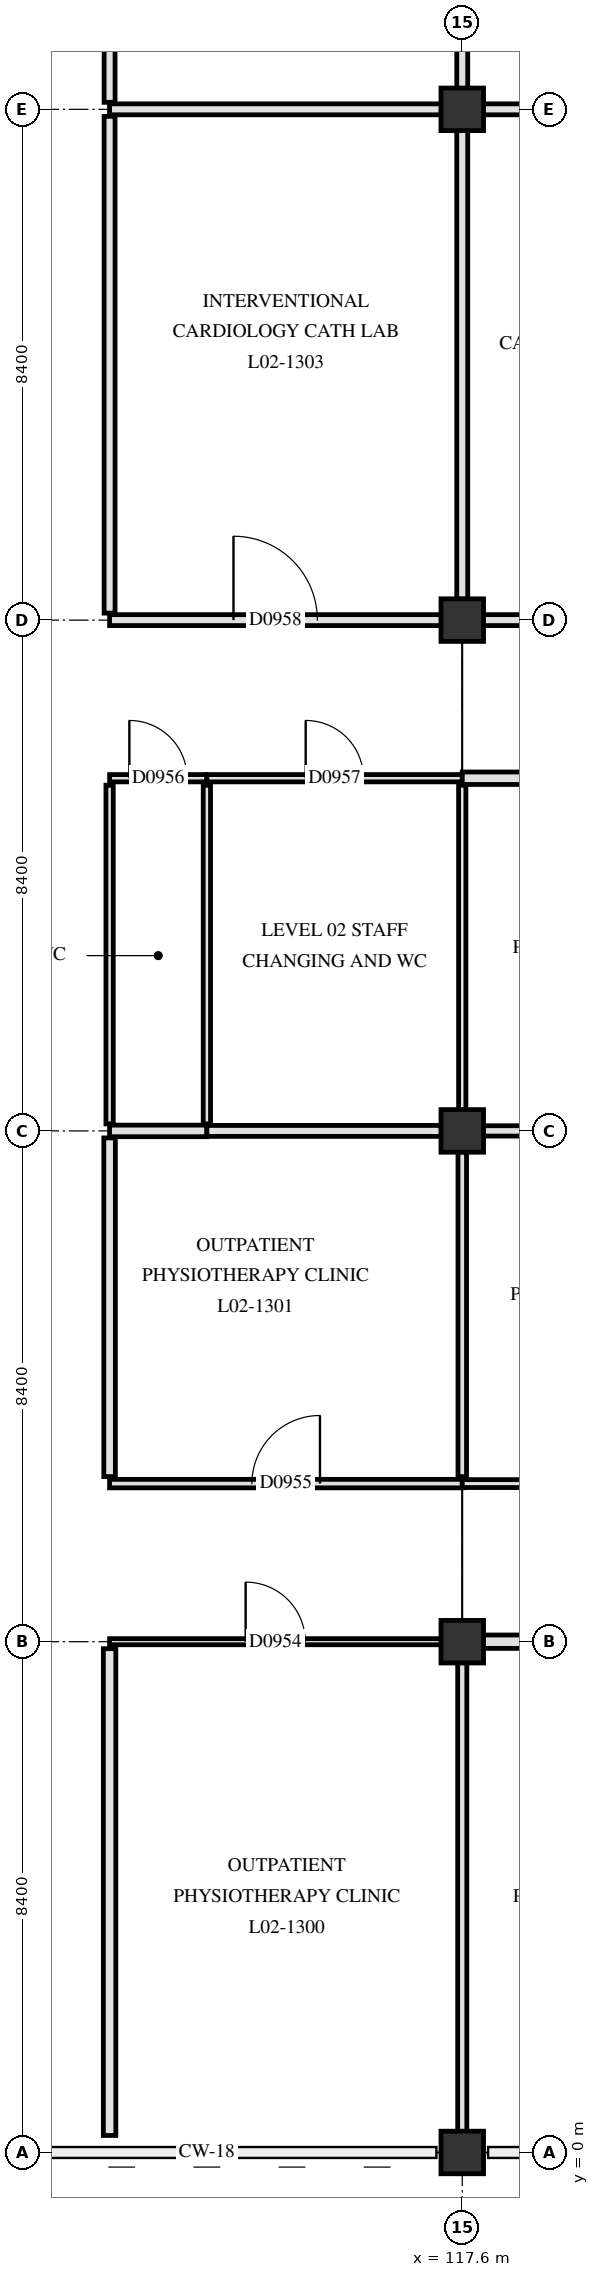
"""IFC4 building model, lengths in metres.
Left out: names, types, materials, properties, quantities, classifications, styles, units other than length and angle.
Written with IfcOpenShell. Run it as: python <this file> out.ifc"""

import sys

from ifc_helpers import new_model, si_unit, direction, frame, frame_2d, origin, origin_2d, place, context, subcontext, project, spatial, rectangle, extrude, element, fill, save


model = new_model("IFC4")
c1 = context("Model", 3, precision=1e-05, world=origin(), true_north=direction((0.0, 1.0)))
c2 = subcontext(c1, "Body", "Model", "MODEL_VIEW")
j1 = project(units=[si_unit("LENGTHUNIT", "METRE"), si_unit("PLANEANGLEUNIT", "RADIAN")], contexts=[c1])
p1 = place(None, origin())
s1 = spatial("IfcSite", under=j1, at=p1, CompositionType="ELEMENT")
p2 = place(p1, origin())
s2 = spatial("IfcBuilding", under=s1, at=p2, CompositionType="ELEMENT")
p3 = place(p2, frame((0.0, 0.0, 9.3)))
s3 = spatial("IfcBuildingStorey", under=s2, at=p3, CompositionType="ELEMENT", Elevation=9.3)
for number, where, z_axis, x_axis in (
    (1, (117.6, 0.0, 0.0), (0.0, 0.0, 1.0), (1.0, 0.0, 0.0)),
    (2, (117.6, 8.4, 0.0), (0.0, 0.0, 1.0), (1.0, 0.0, 0.0)),
    (3, (117.6, 16.8, 0.0), (0.0, 0.0, 1.0), (1.0, 0.0, 0.0)),
    (4, (117.6, 25.2, 0.0), (0.0, 0.0, 1.0), (1.0, 0.0, 0.0)),
    (5, (117.6, 33.6, 0.0), (0.0, 0.0, 1.0), (1.0, 0.0, 0.0)),
):
    element("IfcColumn", number, at=place(p3, frame(where, z_axis=z_axis, x_axis=x_axis)), inside=s3, PredefinedType="COLUMN", context=c2, shape_type="SweptSolid", body=[
        extrude(rectangle(XDim=0.7, YDim=0.7, at=origin_2d()), origin(), (0.0, 0.0, 1.0), 5.1),
    ])
p4 = place(p3, frame((111.8, 8.4, 0.0), z_axis=(0.0, 0.0, 1.0), x_axis=(1.0, 0.0, 0.0)))
e6 = element("IfcWall", 6, at=p4, inside=s3, PredefinedType="PARTITIONING", context=c2, shape_type="SweptSolid", body=[
    extrude(rectangle(XDim=5.455, YDim=0.1, at=frame_2d((2.728, 0.0))), origin(), (0.0, 0.0, 1.0), 4.17),
])
p5 = place(p4, frame((2.238, 0.0, 0.0)))
e7 = element("IfcOpeningElement", 7, at=p5, cuts=e6, PredefinedType="OPENING", context=c2, shape_type="SweptSolid", body=[
    extrude(rectangle(XDim=0.98, YDim=2.12, at=frame_2d((0.49, 1.06))), frame((0.0, 0.06, 0.0), z_axis=(0.0, -1.0, 0.0), x_axis=(1.0, 0.0, 0.0)), (0.0, 0.0, 1.0), 0.12),
])
p6 = place(p3, frame((117.945, 8.4, 0.0), z_axis=(0.0, 0.0, 1.0), x_axis=(1.0, 0.0, 0.0)))
e8 = element("IfcWall", 8, at=p6, inside=s3, PredefinedType="PARTITIONING", context=c2, shape_type="SweptSolid", body=[
    extrude(rectangle(XDim=7.71, YDim=0.22, at=frame_2d((3.855, 0.0))), origin(), (0.0, 0.0, 1.0), 4.17),
])
p7 = place(p6, frame((3.355, 0.0, 0.0)))
e9 = element("IfcOpeningElement", 9, at=p7, cuts=e8, PredefinedType="OPENING", context=c2, shape_type="SweptSolid", body=[
    extrude(rectangle(XDim=1.0, YDim=2.15, at=frame_2d((0.5, 1.075))), frame((0.0, 0.12, 0.0), z_axis=(0.0, -1.0, 0.0), x_axis=(1.0, 0.0, 0.0)), (0.0, 0.0, 1.0), 0.24),
])
p8 = place(p3, frame((111.8, 11.0, 0.0), z_axis=(0.0, 0.0, 1.0), x_axis=(1.0, 0.0, 0.0)))
e10 = element("IfcWall", 10, at=p8, inside=s3, PredefinedType="PARTITIONING", context=c2, shape_type="SweptSolid", body=[
    extrude(rectangle(XDim=5.8, YDim=0.14, at=frame_2d((2.9, 0.0))), origin(), (0.0, 0.0, 1.0), 4.17),
])
p9 = place(p8, frame((2.34, 0.0, 0.0)))
e11 = element("IfcOpeningElement", 11, at=p9, cuts=e10, PredefinedType="OPENING", context=c2, shape_type="SweptSolid", body=[
    extrude(rectangle(XDim=1.12, YDim=2.18, at=frame_2d((0.56, 1.09))), frame((0.0, 0.08, 0.0), z_axis=(0.0, -1.0, 0.0), x_axis=(1.0, 0.0, 0.0)), (0.0, 0.0, 1.0), 0.16),
])
p10 = place(p3, frame((117.6, 11.0, 0.0), z_axis=(0.0, 0.0, 1.0), x_axis=(1.0, 0.0, 0.0)))
e12 = element("IfcWall", 12, at=p10, inside=s3, PredefinedType="PARTITIONING", context=c2, shape_type="SweptSolid", body=[
    extrude(rectangle(XDim=8.4, YDim=0.13, at=frame_2d((4.2, 0.0))), origin(), (0.0, 0.0, 1.0), 4.17),
])
p11 = place(p10, frame((3.675, 0.0, 0.0)))
e13 = element("IfcOpeningElement", 13, at=p11, cuts=e12, PredefinedType="OPENING", context=c2, shape_type="SweptSolid", body=[
    extrude(rectangle(XDim=1.05, YDim=2.15, at=frame_2d((0.525, 1.075))), frame((0.0, 0.075, 0.0), z_axis=(0.0, -1.0, 0.0), x_axis=(1.0, 0.0, 0.0)), (0.0, 0.0, 1.0), 0.15),
])
p12 = place(p3, frame((111.8, 16.8, 0.0), z_axis=(0.0, 0.0, 1.0), x_axis=(1.0, 0.0, 0.0)))
e14 = element("IfcWall", 14, at=p12, inside=s3, PredefinedType="PARTITIONING", context=c2, shape_type="SweptSolid", body=[
    extrude(rectangle(XDim=1.6, YDim=0.19, at=frame_2d((0.8, 0.0))), origin(), (0.0, 0.0, 1.0), 4.17),
])
p13 = place(p3, frame((113.4, 16.8, 0.0), z_axis=(0.0, 0.0, 1.0), x_axis=(1.0, 0.0, 0.0)))
e15 = element("IfcWall", 15, at=p13, inside=s3, PredefinedType="PARTITIONING", context=c2, shape_type="SweptSolid", body=[
    extrude(rectangle(XDim=3.855, YDim=0.18, at=frame_2d((1.927, 0.0))), origin(), (0.0, 0.0, 1.0), 4.17),
])
p14 = place(p3, frame((117.945, 16.8, 0.0), z_axis=(0.0, 0.0, 1.0), x_axis=(1.0, 0.0, 0.0)))
e16 = element("IfcWall", 16, at=p14, inside=s3, PredefinedType="PARTITIONING", context=c2, shape_type="SweptSolid", body=[
    extrude(rectangle(XDim=7.71, YDim=0.17, at=frame_2d((3.855, 0.0))), origin(), (0.0, 0.0, 1.0), 4.17),
])
p15 = place(p3, frame((111.8, 22.6, 0.0), z_axis=(0.0, 0.0, 1.0), x_axis=(1.0, 0.0, 0.0)))
e17 = element("IfcWall", 17, at=p15, inside=s3, PredefinedType="PARTITIONING", context=c2, shape_type="SweptSolid", body=[
    extrude(rectangle(XDim=1.6, YDim=0.12, at=frame_2d((0.8, 0.0))), origin(), (0.0, 0.0, 1.0), 4.77),
])
p16 = place(p15, frame((0.325, 0.0, 0.0)))
e18 = element("IfcOpeningElement", 18, at=p16, cuts=e17, PredefinedType="OPENING", context=c2, shape_type="SweptSolid", body=[
    extrude(rectangle(XDim=0.95, YDim=2.1, at=frame_2d((0.475, 1.05))), frame((0.0, 0.07, 0.0), z_axis=(0.0, -1.0, 0.0), x_axis=(1.0, 0.0, 0.0)), (0.0, 0.0, 1.0), 0.14),
])
p17 = place(p3, frame((113.4, 22.6, 0.0), z_axis=(0.0, 0.0, 1.0), x_axis=(1.0, 0.0, 0.0)))
e19 = element("IfcWall", 19, at=p17, inside=s3, PredefinedType="PARTITIONING", context=c2, shape_type="SweptSolid", body=[
    extrude(rectangle(XDim=4.2, YDim=0.12, at=frame_2d((2.1, 0.0))), origin(), (0.0, 0.0, 1.0), 4.17),
])
p18 = place(p17, frame((1.625, 0.0, 0.0)))
e20 = element("IfcOpeningElement", 20, at=p18, cuts=e19, PredefinedType="OPENING", context=c2, shape_type="SweptSolid", body=[
    extrude(rectangle(XDim=0.95, YDim=2.1, at=frame_2d((0.475, 1.05))), frame((0.0, 0.07, 0.0), z_axis=(0.0, -1.0, 0.0), x_axis=(1.0, 0.0, 0.0)), (0.0, 0.0, 1.0), 0.14),
])
p19 = place(p3, frame((117.6, 22.6, 0.0), z_axis=(0.0, 0.0, 1.0), x_axis=(1.0, 0.0, 0.0)))
e21 = element("IfcWall", 21, at=p19, inside=s3, PredefinedType="PARTITIONING", context=c2, shape_type="SweptSolid", body=[
    extrude(rectangle(XDim=8.4, YDim=0.205, at=frame_2d((4.2, 0.0))), origin(), (0.0, 0.0, 1.0), 4.17),
])
p20 = place(p19, frame((3.725, 0.0, 0.0)))
e22 = element("IfcOpeningElement", 22, at=p20, cuts=e21, PredefinedType="OPENING", context=c2, shape_type="SweptSolid", body=[
    extrude(rectangle(XDim=0.95, YDim=2.1, at=frame_2d((0.475, 1.05))), frame((0.0, 0.113, 0.0), z_axis=(0.0, -1.0, 0.0), x_axis=(1.0, 0.0, 0.0)), (0.0, 0.0, 1.0), 0.225),
])
p21 = place(p3, frame((111.8, 25.2, 0.0), z_axis=(0.0, 0.0, 1.0), x_axis=(1.0, 0.0, 0.0)))
e23 = element("IfcWall", 23, at=p21, inside=s3, PredefinedType="PARTITIONING", context=c2, shape_type="SweptSolid", body=[
    extrude(rectangle(XDim=5.455, YDim=0.18, at=frame_2d((2.728, 0.0))), origin(), (0.0, 0.0, 1.0), 4.17),
])
p22 = place(p21, frame((2.038, 0.0, 0.0)))
e24 = element("IfcOpeningElement", 24, at=p22, cuts=e23, PredefinedType="OPENING", context=c2, shape_type="SweptSolid", body=[
    extrude(rectangle(XDim=1.38, YDim=2.22, at=frame_2d((0.69, 1.11))), frame((0.0, 0.1, 0.0), z_axis=(0.0, -1.0, 0.0), x_axis=(1.0, 0.0, 0.0)), (0.0, 0.0, 1.0), 0.2),
])
p23 = place(p3, frame((117.945, 25.2, 0.0), z_axis=(0.0, 0.0, 1.0), x_axis=(1.0, 0.0, 0.0)))
e25 = element("IfcWall", 25, at=p23, inside=s3, PredefinedType="PARTITIONING", context=c2, shape_type="SweptSolid", body=[
    extrude(rectangle(XDim=7.71, YDim=0.18, at=frame_2d((3.855, 0.0))), origin(), (0.0, 0.0, 1.0), 4.17),
])
p24 = place(p23, frame((3.305, 0.0, 0.0)))
e26 = element("IfcOpeningElement", 26, at=p24, cuts=e25, PredefinedType="OPENING", context=c2, shape_type="SweptSolid", body=[
    extrude(rectangle(XDim=1.1, YDim=2.15, at=frame_2d((0.55, 1.075))), frame((0.0, 0.1, 0.0), z_axis=(0.0, -1.0, 0.0), x_axis=(1.0, 0.0, 0.0)), (0.0, 0.0, 1.0), 0.2),
])
p25 = place(p3, frame((111.8, 33.6, 0.0), z_axis=(0.0, 0.0, 1.0), x_axis=(1.0, 0.0, 0.0)))
e27 = element("IfcWall", 27, at=p25, inside=s3, PredefinedType="PARTITIONING", context=c2, shape_type="SweptSolid", body=[
    extrude(rectangle(XDim=5.455, YDim=0.18, at=frame_2d((2.728, 0.0))), origin(), (0.0, 0.0, 1.0), 4.17),
])
p26 = place(p3, frame((117.945, 33.6, 0.0), z_axis=(0.0, 0.0, 1.0), x_axis=(1.0, 0.0, 0.0)))
e28 = element("IfcWall", 28, at=p26, inside=s3, PredefinedType="PARTITIONING", context=c2, shape_type="SweptSolid", body=[
    extrude(rectangle(XDim=7.81, YDim=0.18, at=frame_2d((3.905, 0.0))), origin(), (0.0, 0.0, 1.0), 4.17),
])
p27 = place(p3, frame((111.8, 0.28, 0.0), z_axis=(0.0, 0.0, 1.0), x_axis=(0.0, 1.0, 0.0)))
e29 = element("IfcWall", 29, at=p27, inside=s3, PredefinedType="PARTITIONING", context=c2, shape_type="SweptSolid", body=[
    extrude(rectangle(XDim=8.005, YDim=0.205, at=frame_2d((4.002, 0.0))), origin(), (0.0, 0.0, 1.0), 4.17),
])
p28 = place(p3, frame((111.8, 11.115, 0.0), z_axis=(0.0, 0.0, 1.0), x_axis=(0.0, 1.0, 0.0)))
e30 = element("IfcWall", 30, at=p28, inside=s3, PredefinedType="PARTITIONING", context=c2, shape_type="SweptSolid", body=[
    extrude(rectangle(XDim=5.57, YDim=0.19, at=frame_2d((2.785, 0.0))), origin(), (0.0, 0.0, 1.0), 4.17),
])
p29 = place(p3, frame((111.8, 16.915, 0.0), z_axis=(0.0, 0.0, 1.0), x_axis=(0.0, 1.0, 0.0)))
e31 = element("IfcWall", 31, at=p29, inside=s3, PredefinedType="PARTITIONING", context=c2, shape_type="SweptSolid", body=[
    extrude(rectangle(XDim=5.57, YDim=0.12, at=frame_2d((2.785, 0.0))), origin(), (0.0, 0.0, 1.0), 4.17),
])
p30 = place(p3, frame((111.8, 25.315, 0.0), z_axis=(0.0, 0.0, 1.0), x_axis=(0.0, 1.0, 0.0)))
e32 = element("IfcWall", 32, at=p30, inside=s3, PredefinedType="PARTITIONING", context=c2, shape_type="SweptSolid", body=[
    extrude(rectangle(XDim=8.17, YDim=0.18, at=frame_2d((4.085, 0.0))), origin(), (0.0, 0.0, 1.0), 4.17),
])
p31 = place(p3, frame((111.8, 33.715, 0.0), z_axis=(0.0, 0.0, 1.0), x_axis=(0.0, 1.0, 0.0)))
e33 = element("IfcWall", 33, at=p31, inside=s3, PredefinedType="PARTITIONING", context=c2, shape_type="SweptSolid", body=[
    extrude(rectangle(XDim=8.17, YDim=0.18, at=frame_2d((4.085, 0.0))), origin(), (0.0, 0.0, 1.0), 4.17),
])
p32 = place(p3, frame((113.4, 16.915, 0.0), z_axis=(0.0, 0.0, 1.0), x_axis=(0.0, 1.0, 0.0)))
e34 = element("IfcWall", 34, at=p32, inside=s3, PredefinedType="PARTITIONING", context=c2, shape_type="SweptSolid", body=[
    extrude(rectangle(XDim=5.57, YDim=0.12, at=frame_2d((2.785, 0.0))), origin(), (0.0, 0.0, 1.0), 4.17),
])
p33 = place(p3, frame((117.6, 0.345, 0.0), z_axis=(0.0, 0.0, 1.0), x_axis=(0.0, 1.0, 0.0)))
e35 = element("IfcWall", 35, at=p33, inside=s3, PredefinedType="PARTITIONING", context=c2, shape_type="SweptSolid", body=[
    extrude(rectangle(XDim=7.71, YDim=0.15, at=frame_2d((3.855, 0.0))), origin(), (0.0, 0.0, 1.0), 4.17),
])
p34 = place(p3, frame((117.6, 11.115, 0.0), z_axis=(0.0, 0.0, 1.0), x_axis=(0.0, 1.0, 0.0)))
e36 = element("IfcWall", 36, at=p34, inside=s3, PredefinedType="PARTITIONING", context=c2, shape_type="SweptSolid", body=[
    extrude(rectangle(XDim=5.34, YDim=0.14, at=frame_2d((2.67, 0.0))), origin(), (0.0, 0.0, 1.0), 4.17),
])
p35 = place(p3, frame((117.6, 17.145, 0.0), z_axis=(0.0, 0.0, 1.0), x_axis=(0.0, 1.0, 0.0)))
e37 = element("IfcWall", 37, at=p35, inside=s3, PredefinedType="PARTITIONING", context=c2, shape_type="SweptSolid", body=[
    extrude(rectangle(XDim=5.34, YDim=0.12, at=frame_2d((2.67, 0.0))), origin(), (0.0, 0.0, 1.0), 4.17),
])
for number, where, z_axis, x_axis in (
    (38, (117.6, 25.545, 0.0), (0.0, 0.0, 1.0), (0.0, 1.0, 0.0)),
    (39, (117.6, 33.945, 0.0), (0.0, 0.0, 1.0), (0.0, 1.0, 0.0)),
):
    element("IfcWall", number, at=place(p3, frame(where, z_axis=z_axis, x_axis=x_axis)), inside=s3, PredefinedType="PARTITIONING", context=c2, shape_type="SweptSolid", body=[
        extrude(rectangle(XDim=7.71, YDim=0.18, at=frame_2d((3.855, 0.0))), origin(), (0.0, 0.0, 1.0), 4.17),
    ])
p36 = place(p5, origin())
e40 = element("IfcDoor", 40, at=p36, inside=s3, OperationType="SINGLE_SWING_LEFT", PredefinedType="DOOR", context=c2, shape_type="SweptSolid", body=[
    extrude(rectangle(XDim=0.98, YDim=2.12, at=frame_2d((0.49, 1.06))), frame((0.0, 0.025, 0.0), z_axis=(0.0, -1.0, 0.0), x_axis=(1.0, 0.0, 0.0)), (0.0, 0.0, 1.0), 0.05),
])
fill(e7, e40)
p37 = place(p9, origin())
e41 = element("IfcDoor", 41, at=p37, inside=s3, OperationType="SINGLE_SWING_RIGHT", PredefinedType="DOOR", context=c2, shape_type="SweptSolid", body=[
    extrude(rectangle(XDim=1.12, YDim=2.18, at=frame_2d((0.56, 1.09))), frame((0.0, 0.025, 0.0), z_axis=(0.0, -1.0, 0.0), x_axis=(1.0, 0.0, 0.0)), (0.0, 0.0, 1.0), 0.05),
])
fill(e11, e41)
p38 = place(p16, origin())
e42 = element("IfcDoor", 42, at=p38, inside=s3, OperationType="SINGLE_SWING_LEFT", PredefinedType="DOOR", context=c2, shape_type="SweptSolid", body=[
    extrude(rectangle(XDim=0.95, YDim=2.1, at=frame_2d((0.475, 1.05))), frame((0.0, 0.025, 0.0), z_axis=(0.0, -1.0, 0.0), x_axis=(1.0, 0.0, 0.0)), (0.0, 0.0, 1.0), 0.05),
])
fill(e18, e42)
p39 = place(p18, origin())
e43 = element("IfcDoor", 43, at=p39, inside=s3, OperationType="SINGLE_SWING_LEFT", PredefinedType="DOOR", context=c2, shape_type="SweptSolid", body=[
    extrude(rectangle(XDim=0.95, YDim=2.1, at=frame_2d((0.475, 1.05))), frame((0.0, 0.025, 0.0), z_axis=(0.0, -1.0, 0.0), x_axis=(1.0, 0.0, 0.0)), (0.0, 0.0, 1.0), 0.05),
])
fill(e20, e43)
p40 = place(p22, origin())
e44 = element("IfcDoor", 44, at=p40, inside=s3, OperationType="SINGLE_SWING_LEFT", PredefinedType="DOOR", context=c2, shape_type="SweptSolid", body=[
    extrude(rectangle(XDim=1.38, YDim=2.22, at=frame_2d((0.69, 1.11))), frame((0.0, 0.025, 0.0), z_axis=(0.0, -1.0, 0.0), x_axis=(1.0, 0.0, 0.0)), (0.0, 0.0, 1.0), 0.05),
])
fill(e24, e44)
save(model, sys.argv[1])
